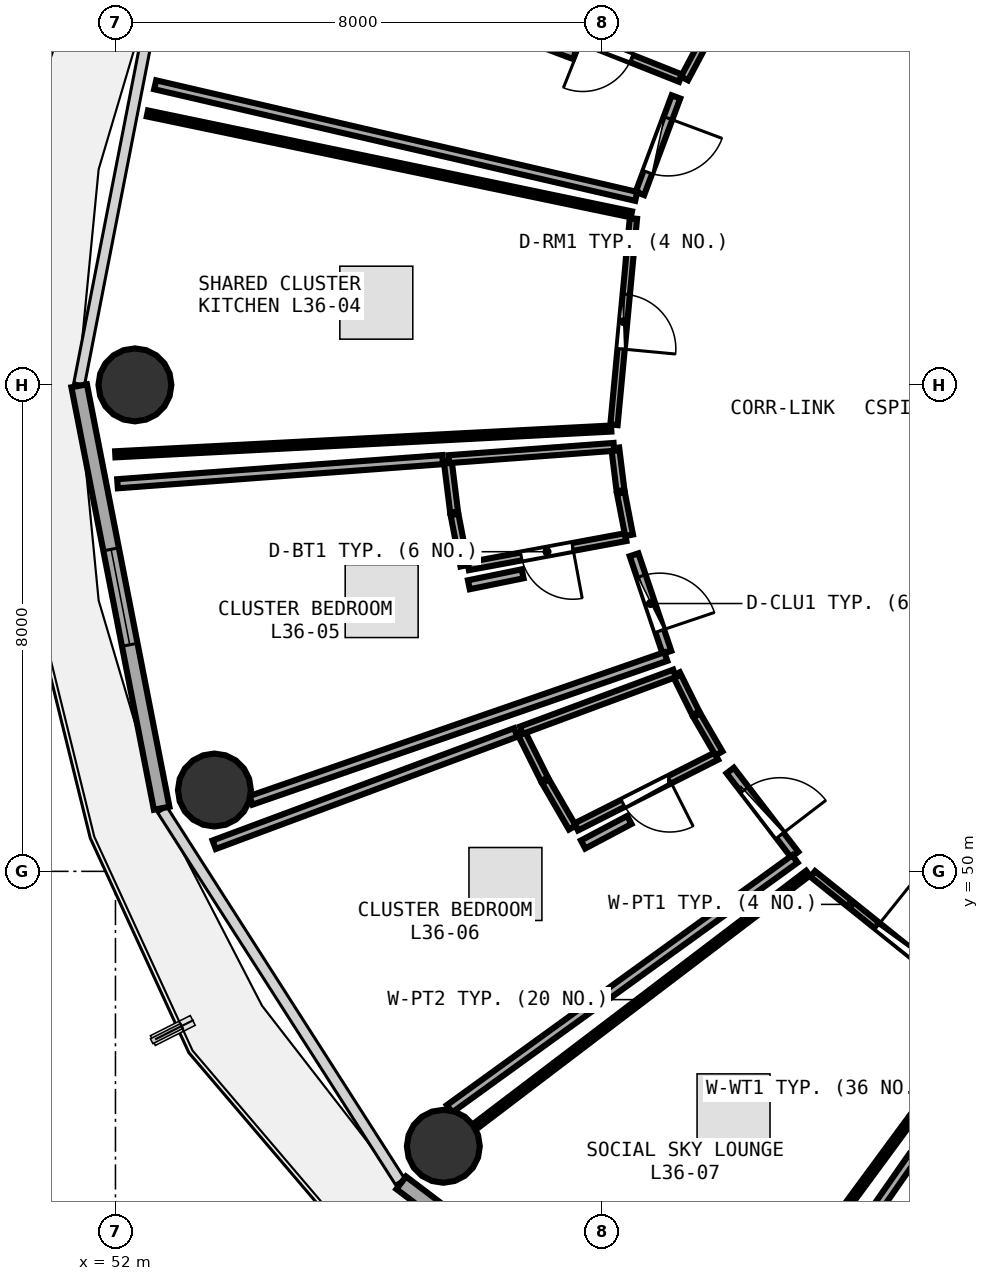
"""IFC4 building model, lengths in metres.
Left out: names, types, materials, properties, quantities, classifications, styles, units other than length and angle.
Written with IfcOpenShell. Run it as: python <this file> out.ifc"""

import sys

from ifc_helpers import new_model, si_unit, direction, frame, frame_2d, origin, origin_2d, place, context, subcontext, project, spatial, rectangle, circle, extrude, element, fill, save


model = new_model("IFC4")
c1 = context("Model", 3, precision=1e-05, world=origin(), true_north=direction((0.0, 1.0)))
c2 = subcontext(c1, "Body", "Model", "MODEL_VIEW")
j1 = project(units=[si_unit("LENGTHUNIT", "METRE"), si_unit("PLANEANGLEUNIT", "RADIAN")], contexts=[c1])
p1 = place(None, origin())
s1 = spatial("IfcSite", under=j1, at=p1, CompositionType="ELEMENT")
p2 = place(p1, origin())
s2 = spatial("IfcBuilding", under=s1, at=p2, CompositionType="ELEMENT")
p3 = place(p2, frame((0.0, 0.0, 143.1)))
s3 = spatial("IfcBuildingStorey", under=s2, at=p3, CompositionType="ELEMENT", Elevation=143.1)
for number, where, z_axis, x_axis in (
    (1, (52.32, 58.0, 0.0), (0.0, 0.0, 1.0), (1.0, 0.0, 0.0)),
    (2, (53.627, 51.337, 0.0), (0.0, 0.0, 1.0), (1.0, 0.0, 0.0)),
    (3, (57.392, 45.479, 0.0), (0.0, 0.0, 1.0), (1.0, 0.0, 0.0)),
):
    element("IfcColumn", number, at=place(p3, frame(where, z_axis=z_axis, x_axis=x_axis)), inside=s3, PredefinedType="COLUMN", context=c2, shape_type="SweptSolid", body=[
        extrude(circle(Radius=0.6, at=origin_2d()), origin(), (0.0, 0.0, 1.0), 3.75),
    ])
p4 = place(p3, frame((51.403, 57.985, 0.0), z_axis=(0.0, 0.0, 1.0), x_axis=(0.191716984769, -0.981450252306, 0.0)))
e4 = element("IfcWall", 4, at=p4, inside=s3, PredefinedType="SOLIDWALL", context=c2, shape_type="SweptSolid", body=[
    extrude(rectangle(XDim=7.079, YDim=0.26, at=frame_2d((3.54, 0.0))), origin(), (0.0, 0.0, 1.0), 3.475),
])
p5 = place(p4, frame((2.74, 0.0, 0.85)))
e5 = element("IfcOpeningElement", 5, at=p5, cuts=e4, PredefinedType="OPENING", context=c2, shape_type="SweptSolid", body=[
    extrude(rectangle(XDim=1.6, YDim=1.45, at=frame_2d((0.8, 0.725))), frame((0.0, 0.14, 0.0), z_axis=(0.0, -1.0, 0.0), x_axis=(1.0, 0.0, 0.0)), (0.0, 0.0, 1.0), 0.28),
])
p6 = place(p3, frame((56.699, 44.878, 0.0), z_axis=(0.0, 0.0, 1.0), x_axis=(0.797163719609, -0.603763202042, 0.0)))
e6 = element("IfcWall", 6, at=p6, inside=s3, PredefinedType="SOLIDWALL", context=c2, shape_type="SweptSolid", body=[
    extrude(rectangle(XDim=7.512, YDim=0.26, at=frame_2d((3.756, 0.0))), origin(), (0.0, 0.0, 1.0), 3.475),
])
p7 = place(p6, frame((2.956, 0.0, 0.85)))
e7 = element("IfcOpeningElement", 7, at=p7, cuts=e6, PredefinedType="OPENING", context=c2, shape_type="SweptSolid", body=[
    extrude(rectangle(XDim=1.6, YDim=1.45, at=frame_2d((0.8, 0.725))), frame((0.0, 0.14, 0.0), z_axis=(0.0, -1.0, 0.0), x_axis=(1.0, 0.0, 0.0)), (0.0, 0.0, 1.0), 0.28),
])
p8 = place(p3, frame((61.293, 63.044, 0.0), z_axis=(0.0, 0.0, 1.0), x_axis=(-0.929051463741, 0.369950507123, 0.0)))
e8 = element("IfcWall", 8, at=p8, inside=s3, PredefinedType="PLUMBINGWALL", context=c2, shape_type="SweptSolid", body=[
    extrude(rectangle(XDim=2.602, YDim=0.13, at=frame_2d((1.301, 0.0))), origin(), (0.0, 0.0, 1.0), 3.235),
])
p9 = place(p8, frame((0.871, 0.0, 0.0)))
e9 = element("IfcOpeningElement", 9, at=p9, cuts=e8, PredefinedType="OPENING", context=c2, shape_type="SweptSolid", body=[
    extrude(rectangle(XDim=0.86, YDim=2.05, at=frame_2d((0.43, 1.025))), frame((0.0, 0.075, 0.0), z_axis=(0.0, -1.0, 0.0), x_axis=(1.0, 0.0, 0.0)), (0.0, 0.0, 1.0), 0.15),
])
p10 = place(p3, frame((61.218, 62.736, 0.0), z_axis=(0.0, 0.0, 1.0), x_axis=(-0.349718783302, -0.93685472332, 0.0)))
e10 = element("IfcWall", 10, at=p10, inside=s3, PredefinedType="PARTITIONING", context=c2, shape_type="SweptSolid", body=[
    extrude(rectangle(XDim=1.696, YDim=0.15, at=frame_2d((0.848, 0.0))), origin(), (0.0, 0.0, 1.0), 3.235),
])
p11 = place(p10, frame((0.373, 0.0, 0.0)))
e11 = element("IfcOpeningElement", 11, at=p11, cuts=e10, PredefinedType="OPENING", context=c2, shape_type="SweptSolid", body=[
    extrude(rectangle(XDim=0.95, YDim=2.08, at=frame_2d((0.475, 1.04))), frame((0.0, 0.085, 0.0), z_axis=(0.0, -1.0, 0.0), x_axis=(1.0, 0.0, 0.0)), (0.0, 0.0, 1.0), 0.17),
])
p12 = place(p3, frame((60.518, 60.736, 0.0), z_axis=(0.0, 0.0, 1.0), x_axis=(-0.093855600535, -0.995585820634, 0.0)))
e12 = element("IfcWall", 12, at=p12, inside=s3, PredefinedType="PARTITIONING", context=c2, shape_type="SweptSolid", body=[
    extrude(rectangle(XDim=3.408, YDim=0.12, at=frame_2d((1.704, 0.0))), origin(), (0.0, 0.0, 1.0), 2.975),
])
p13 = place(p12, frame((1.254, 0.0, 0.0)))
e13 = element("IfcOpeningElement", 13, at=p13, cuts=e12, PredefinedType="OPENING", context=c2, shape_type="SweptSolid", body=[
    extrude(rectangle(XDim=0.9, YDim=2.08, at=frame_2d((0.45, 1.04))), frame((0.0, 0.07, 0.0), z_axis=(0.0, -1.0, 0.0), x_axis=(1.0, 0.0, 0.0)), (0.0, 0.0, 1.0), 0.14),
])
p14 = place(p3, frame((60.392, 55.496, 0.0), z_axis=(0.0, 0.0, 1.0), x_axis=(-0.983321304086, -0.181876916981, 0.0)))
e14 = element("IfcWall", 14, at=p14, inside=s3, PredefinedType="PLUMBINGWALL", context=c2, shape_type="SweptSolid", body=[
    extrude(rectangle(XDim=2.635, YDim=0.13, at=frame_2d((1.317, 0.0))), origin(), (0.0, 0.0, 1.0), 3.175),
])
p15 = place(p14, frame((0.887, 0.0, 0.0)))
e15 = element("IfcOpeningElement", 15, at=p15, cuts=e14, PredefinedType="OPENING", context=c2, shape_type="SweptSolid", body=[
    extrude(rectangle(XDim=0.86, YDim=2.05, at=frame_2d((0.43, 1.025))), frame((0.0, 0.075, 0.0), z_axis=(0.0, -1.0, 0.0), x_axis=(1.0, 0.0, 0.0)), (0.0, 0.0, 1.0), 0.15),
])
p16 = place(p3, frame((60.529, 55.206, 0.0), z_axis=(0.0, 0.0, 1.0), x_axis=(0.319297944841, -0.947654379202, 0.0)))
e16 = element("IfcWall", 16, at=p16, inside=s3, PredefinedType="PARTITIONING", context=c2, shape_type="SweptSolid", body=[
    extrude(rectangle(XDim=1.693, YDim=0.15, at=frame_2d((0.846, 0.0))), origin(), (0.0, 0.0, 1.0), 3.235),
])
p17 = place(p16, frame((0.371, 0.0, 0.0)))
e17 = element("IfcOpeningElement", 17, at=p17, cuts=e16, PredefinedType="OPENING", context=c2, shape_type="SweptSolid", body=[
    extrude(rectangle(XDim=0.95, YDim=2.08, at=frame_2d((0.475, 1.04))), frame((0.0, 0.085, 0.0), z_axis=(0.0, -1.0, 0.0), x_axis=(1.0, 0.0, 0.0)), (0.0, 0.0, 1.0), 0.17),
])
p18 = place(p3, frame((61.883, 51.895, 0.0), z_axis=(0.0, 0.0, 1.0), x_axis=(-0.892490597906, -0.451065995891, 0.0)))
e18 = element("IfcWall", 18, at=p18, inside=s3, PredefinedType="PLUMBINGWALL", context=c2, shape_type="SweptSolid", body=[
    extrude(rectangle(XDim=2.583, YDim=0.13, at=frame_2d((1.292, 0.0))), origin(), (0.0, 0.0, 1.0), 2.975),
])
p19 = place(p18, frame((0.861, 0.0, 0.0)))
e19 = element("IfcOpeningElement", 19, at=p19, cuts=e18, PredefinedType="OPENING", context=c2, shape_type="SweptSolid", body=[
    extrude(rectangle(XDim=0.86, YDim=2.05, at=frame_2d((0.43, 1.025))), frame((0.0, 0.075, 0.0), z_axis=(0.0, -1.0, 0.0), x_axis=(1.0, 0.0, 0.0)), (0.0, 0.0, 1.0), 0.15),
])
p20 = place(p3, frame((62.111, 51.658, 0.0), z_axis=(0.0, 0.0, 1.0), x_axis=(0.608307977949, -0.793701079729, 0.0)))
e20 = element("IfcWall", 20, at=p20, inside=s3, PredefinedType="PARTITIONING", context=c2, shape_type="SweptSolid", body=[
    extrude(rectangle(XDim=1.742, YDim=0.15, at=frame_2d((0.871, 0.0))), origin(), (0.0, 0.0, 1.0), 2.975),
])
p21 = place(p20, frame((0.396, 0.0, 0.0)))
e21 = element("IfcOpeningElement", 21, at=p21, cuts=e20, PredefinedType="OPENING", context=c2, shape_type="SweptSolid", body=[
    extrude(rectangle(XDim=0.95, YDim=2.08, at=frame_2d((0.475, 1.04))), frame((0.0, 0.085, 0.0), z_axis=(0.0, -1.0, 0.0), x_axis=(1.0, 0.0, 0.0)), (0.0, 0.0, 1.0), 0.17),
])
p22 = place(p3, frame((63.468, 49.957, 0.0), z_axis=(0.0, 0.0, 1.0), x_axis=(0.78006790059, -0.625694870099, 0.0)))
e22 = element("IfcWall", 22, at=p22, inside=s3, PredefinedType="PARTITIONING", context=c2, shape_type="SweptSolid", body=[
    extrude(rectangle(XDim=3.631, YDim=0.12, at=frame_2d((1.815, 0.0))), origin(), (0.0, 0.0, 1.0), 2.975),
])
p23 = place(p22, frame((1.366, 0.0, 0.0)))
e23 = element("IfcOpeningElement", 23, at=p23, cuts=e22, PredefinedType="OPENING", context=c2, shape_type="SweptSolid", body=[
    extrude(rectangle(XDim=0.9, YDim=2.08, at=frame_2d((0.45, 1.04))), frame((0.0, 0.07, 0.0), z_axis=(0.0, -1.0, 0.0), x_axis=(1.0, 0.0, 0.0)), (0.0, 0.0, 1.0), 0.14),
])
p24 = place(p3, frame((61.697, 63.676, 0.0), z_axis=(0.0, 0.0, 1.0), x_axis=(-0.469163481751, -0.88311133352, 0.0)))
e24 = element("IfcWall", 24, at=p24, inside=s3, PredefinedType="PLUMBINGWALL", context=c2, shape_type="SweptSolid", body=[
    extrude(rectangle(XDim=0.721, YDim=0.13, at=frame_2d((0.36, 0.0))), origin(), (0.0, 0.0, 1.0), 3.48),
])
p25 = place(p3, frame((60.565, 61.1, 0.0), z_axis=(0.0, 0.0, 1.0), x_axis=(-0.97414388338, 0.225928516292, 0.0)))
e25 = element("IfcWall", 25, at=p25, inside=s3, PredefinedType="PARTITIONING", context=c2, shape_type="SweptSolid", body=[
    extrude(rectangle(XDim=8.122, YDim=0.15, at=frame_2d((4.061, 0.0))), origin(), (0.0, 0.0, 1.0), 3.025),
])
p26 = place(p3, frame((58.688, 63.755, 0.0), z_axis=(0.0, 0.0, 1.0), x_axis=(0.935532386314, -0.353240929336, 0.0)))
e26 = element("IfcWall", 26, at=p26, inside=s3, PredefinedType="PARTITIONING", context=c2, shape_type="SweptSolid", body=[
    extrude(rectangle(XDim=0.922, YDim=0.15, at=frame_2d((0.461, 0.0))), origin(), (0.0, 0.0, 1.0), 3.48),
])
p27 = place(p3, frame((60.153, 57.282, 0.0), z_axis=(0.0, 0.0, 1.0), x_axis=(-0.998652620107, -0.051893586821, 0.0)))
e27 = element("IfcWall", 27, at=p27, inside=s3, PredefinedType="PARTITIONING", context=c2, shape_type="SweptSolid", body=[
    extrude(rectangle(XDim=8.167, YDim=0.1, at=frame_2d((4.083, 0.0))), origin(), (0.0, 0.0, 1.0), 3.025),
])
p28 = place(p3, frame((52.525, 62.464, 0.0), z_axis=(0.0, 0.0, 1.0), x_axis=(0.978946183013, -0.204118521367, 0.0)))
e28 = element("IfcWall", 28, at=p28, inside=s3, PredefinedType="PARTITIONING", context=c2, shape_type="SweptSolid", body=[
    extrude(rectangle(XDim=8.131, YDim=0.1, at=frame_2d((4.065, 0.0))), origin(), (0.0, 0.0, 1.0), 3.025),
])
p29 = place(p3, frame((60.219, 56.962, 0.0), z_axis=(0.0, 0.0, 1.0), x_axis=(0.12297181285, -0.992410163816, 0.0)))
e29 = element("IfcWall", 29, at=p29, inside=s3, PredefinedType="PLUMBINGWALL", context=c2, shape_type="SweptSolid", body=[
    extrude(rectangle(XDim=0.707, YDim=0.13, at=frame_2d((0.354, 0.0))), origin(), (0.0, 0.0, 1.0), 3.48),
])
p30 = place(p3, frame((60.313, 56.221, 0.0), z_axis=(0.0, 0.0, 1.0), x_axis=(0.190075536698, -0.981769469045, 0.0)))
e30 = element("IfcWall", 30, at=p30, inside=s3, PredefinedType="PLUMBINGWALL", context=c2, shape_type="SweptSolid", body=[
    extrude(rectangle(XDim=0.708, YDim=0.13, at=frame_2d((0.354, 0.0))), origin(), (0.0, 0.0, 1.0), 3.48),
])
p31 = place(p3, frame((57.738, 55.026, 0.0), z_axis=(0.0, 0.0, 1.0), x_axis=(-0.189438154161, 0.981892654901, 0.0)))
e31 = element("IfcWall", 31, at=p31, inside=s3, PredefinedType="PLUMBINGWALL", context=c2, shape_type="SweptSolid", body=[
    extrude(rectangle(XDim=0.858, YDim=0.13, at=frame_2d((0.429, 0.0))), origin(), (0.0, 0.0, 1.0), 3.48),
])
p32 = place(p3, frame((57.57, 55.908, 0.0), z_axis=(0.0, 0.0, 1.0), x_axis=(-0.124069838268, 0.992273488123, 0.0)))
e32 = element("IfcWall", 32, at=p32, inside=s3, PredefinedType="PLUMBINGWALL", context=c2, shape_type="SweptSolid", body=[
    extrude(rectangle(XDim=0.856, YDim=0.13, at=frame_2d((0.428, 0.0))), origin(), (0.0, 0.0, 1.0), 3.48),
])
p33 = place(p3, frame((57.481, 56.779, 0.0), z_axis=(0.0, 0.0, 1.0), x_axis=(0.997248398148, 0.074132532608, 0.0)))
e33 = element("IfcWall", 33, at=p33, inside=s3, PredefinedType="PLUMBINGWALL", context=c2, shape_type="SweptSolid", body=[
    extrude(rectangle(XDim=2.724, YDim=0.13, at=frame_2d((1.362, 0.0))), origin(), (0.0, 0.0, 1.0), 3.175),
])
p34 = place(p3, frame((61.051, 53.532, 0.0), z_axis=(0.0, 0.0, 1.0), x_axis=(-0.944870237137, -0.327445010608, 0.0)))
e34 = element("IfcWall", 34, at=p34, inside=s3, PredefinedType="PARTITIONING", context=c2, shape_type="SweptSolid", body=[
    extrude(rectangle(XDim=7.22, YDim=0.15, at=frame_2d((3.61, 0.0))), origin(), (0.0, 0.0, 1.0), 2.975),
])
p35 = place(p3, frame((52.034, 56.374, 0.0), z_axis=(0.0, 0.0, 1.0), x_axis=(0.997255565749, 0.074036049215, 0.0)))
e35 = element("IfcWall", 35, at=p35, inside=s3, PredefinedType="PARTITIONING", context=c2, shape_type="SweptSolid", body=[
    extrude(rectangle(XDim=5.362, YDim=0.15, at=frame_2d((2.681, 0.0))), origin(), (0.0, 0.0, 1.0), 3.025),
])
p36 = place(p3, frame((57.812, 54.713, 0.0), z_axis=(0.0, 0.0, 1.0), x_axis=(0.979802976843, 0.199965313418, 0.0)))
e36 = element("IfcWall", 36, at=p36, inside=s3, PredefinedType="PARTITIONING", context=c2, shape_type="SweptSolid", body=[
    extrude(rectangle(XDim=0.902, YDim=0.15, at=frame_2d((0.451, 0.0))), origin(), (0.0, 0.0, 1.0), 3.175),
])
p37 = place(p3, frame((61.223, 53.245, 0.0), z_axis=(0.0, 0.0, 1.0), x_axis=(0.445176568549, -0.895442808232, 0.0)))
e37 = element("IfcWall", 37, at=p37, inside=s3, PredefinedType="PLUMBINGWALL", context=c2, shape_type="SweptSolid", body=[
    extrude(rectangle(XDim=0.719, YDim=0.13, at=frame_2d((0.36, 0.0))), origin(), (0.0, 0.0, 1.0), 3.235),
])
p38 = place(p3, frame((61.562, 52.566, 0.0), z_axis=(0.0, 0.0, 1.0), x_axis=(0.502403748171, -0.864633144069, 0.0)))
e38 = element("IfcWall", 38, at=p38, inside=s3, PredefinedType="PLUMBINGWALL", context=c2, shape_type="SweptSolid", body=[
    extrude(rectangle(XDim=0.725, YDim=0.13, at=frame_2d((0.362, 0.0))), origin(), (0.0, 0.0, 1.0), 3.48),
])
p39 = place(p3, frame((59.514, 50.72, 0.0), z_axis=(0.0, 0.0, 1.0), x_axis=(-0.501222652689, 0.865318353227, 0.0)))
e39 = element("IfcWall", 39, at=p39, inside=s3, PredefinedType="PLUMBINGWALL", context=c2, shape_type="SweptSolid", body=[
    extrude(rectangle(XDim=0.878, YDim=0.13, at=frame_2d((0.439, 0.0))), origin(), (0.0, 0.0, 1.0), 2.975),
])
p40 = place(p3, frame((59.055, 51.515, 0.0), z_axis=(0.0, 0.0, 1.0), x_axis=(-0.446317376376, 0.894874739584, 0.0)))
e40 = element("IfcWall", 40, at=p40, inside=s3, PredefinedType="PLUMBINGWALL", context=c2, shape_type="SweptSolid", body=[
    extrude(rectangle(XDim=0.872, YDim=0.13, at=frame_2d((0.436, 0.0))), origin(), (0.0, 0.0, 1.0), 3.48),
])
p41 = place(p3, frame((58.676, 52.32, 0.0), z_axis=(0.0, 0.0, 1.0), x_axis=(0.937399857035, 0.348254946887, 0.0)))
e41 = element("IfcWall", 41, at=p41, inside=s3, PredefinedType="PLUMBINGWALL", context=c2, shape_type="SweptSolid", body=[
    extrude(rectangle(XDim=2.688, YDim=0.13, at=frame_2d((1.344, 0.0))), origin(), (0.0, 0.0, 1.0), 3.235),
])
p42 = place(p3, frame((63.175, 50.205, 0.0), z_axis=(0.0, 0.0, 1.0), x_axis=(-0.810227225477, -0.586115895618, 0.0)))
e42 = element("IfcWall", 42, at=p42, inside=s3, PredefinedType="PARTITIONING", context=c2, shape_type="SweptSolid", body=[
    extrude(rectangle(XDim=7.011, YDim=0.15, at=frame_2d((3.506, 0.0))), origin(), (0.0, 0.0, 1.0), 3.175),
])
p43 = place(p3, frame((53.624, 50.438, 0.0), z_axis=(0.0, 0.0, 1.0), x_axis=(0.937175901168, 0.348857177468, 0.0)))
e43 = element("IfcWall", 43, at=p43, inside=s3, PredefinedType="PARTITIONING", context=c2, shape_type="SweptSolid", body=[
    extrude(rectangle(XDim=5.292, YDim=0.15, at=frame_2d((2.646, 0.0))), origin(), (0.0, 0.0, 1.0), 2.975),
])
p44 = place(p3, frame((59.69, 50.442, 0.0), z_axis=(0.0, 0.0, 1.0), x_axis=(0.883456769574, 0.468512685308, 0.0)))
e44 = element("IfcWall", 44, at=p44, inside=s3, PredefinedType="PARTITIONING", context=c2, shape_type="SweptSolid", body=[
    extrude(rectangle(XDim=0.861, YDim=0.15, at=frame_2d((0.431, 0.0))), origin(), (0.0, 0.0, 1.0), 3.48),
])
p45 = place(p3, frame((66.323, 47.615, 0.0), z_axis=(0.0, 0.0, 1.0), x_axis=(-0.592678959784, -0.805438793845, 0.0)))
e45 = element("IfcWall", 45, at=p45, inside=s3, PredefinedType="PARTITIONING", context=c2, shape_type="SweptSolid", body=[
    extrude(rectangle(XDim=7.624, YDim=0.1, at=frame_2d((3.812, 0.0))), origin(), (0.0, 0.0, 1.0), 2.975),
])
p46 = place(p3, frame((57.921, 45.811, 0.0), z_axis=(0.0, 0.0, 1.0), x_axis=(0.79595600815, 0.60535446896, 0.0)))
e46 = element("IfcWall", 46, at=p46, inside=s3, PredefinedType="PARTITIONING", context=c2, shape_type="SweptSolid", body=[
    extrude(rectangle(XDim=6.869, YDim=0.1, at=frame_2d((3.435, 0.0))), origin(), (0.0, 0.0, 1.0), 2.975),
])
p47 = place(p3, frame((62.257, 41.211, 0.0), z_axis=(0.0, 0.0, 1.0), x_axis=(0.572125752908, 0.820165911789, 0.0)))
e47 = element("IfcWall", 47, at=p47, inside=s3, PredefinedType="PARTITIONING", context=c2, shape_type="SweptSolid", body=[
    extrude(rectangle(XDim=4.992, YDim=0.15, at=frame_2d((2.496, 0.0))), origin(), (0.0, 0.0, 1.0), 2.975),
])
p48 = place(p5, origin())
e48 = element("IfcWindow", 48, at=p48, inside=s3, PartitioningType="SINGLE_PANEL", PredefinedType="WINDOW", context=c2, shape_type="SweptSolid", body=[
    extrude(rectangle(XDim=1.6, YDim=1.45, at=frame_2d((0.8, 0.725))), frame((0.0, 0.03, 0.0), z_axis=(0.0, -1.0, 0.0), x_axis=(1.0, 0.0, 0.0)), (0.0, 0.0, 1.0), 0.06),
])
fill(e5, e48)
p49 = place(p9, origin())
e49 = element("IfcDoor", 49, at=p49, inside=s3, OperationType="SINGLE_SWING_RIGHT", PredefinedType="DOOR", context=c2, shape_type="SweptSolid", body=[
    extrude(rectangle(XDim=0.86, YDim=2.05, at=frame_2d((0.43, 1.025))), frame((0.0, 0.025, 0.0), z_axis=(0.0, -1.0, 0.0), x_axis=(1.0, 0.0, 0.0)), (0.0, 0.0, 1.0), 0.05),
])
fill(e9, e49)
p50 = place(p11, origin())
e50 = element("IfcDoor", 50, at=p50, inside=s3, OperationType="SINGLE_SWING_LEFT", PredefinedType="DOOR", context=c2, shape_type="SweptSolid", body=[
    extrude(rectangle(XDim=0.95, YDim=2.08, at=frame_2d((0.475, 1.04))), frame((0.0, 0.025, 0.0), z_axis=(0.0, -1.0, 0.0), x_axis=(1.0, 0.0, 0.0)), (0.0, 0.0, 1.0), 0.05),
])
fill(e11, e50)
p51 = place(p13, origin())
e51 = element("IfcDoor", 51, at=p51, inside=s3, OperationType="SINGLE_SWING_RIGHT", PredefinedType="DOOR", context=c2, shape_type="SweptSolid", body=[
    extrude(rectangle(XDim=0.9, YDim=2.08, at=frame_2d((0.45, 1.04))), frame((0.0, 0.025, 0.0), z_axis=(0.0, -1.0, 0.0), x_axis=(1.0, 0.0, 0.0)), (0.0, 0.0, 1.0), 0.05),
])
fill(e13, e51)
p52 = place(p15, origin())
e52 = element("IfcDoor", 52, at=p52, inside=s3, OperationType="SINGLE_SWING_LEFT", PredefinedType="DOOR", context=c2, shape_type="SweptSolid", body=[
    extrude(rectangle(XDim=0.86, YDim=2.05, at=frame_2d((0.43, 1.025))), frame((0.0, 0.025, 0.0), z_axis=(0.0, -1.0, 0.0), x_axis=(1.0, 0.0, 0.0)), (0.0, 0.0, 1.0), 0.05),
])
fill(e15, e52)
p53 = place(p17, origin())
e53 = element("IfcDoor", 53, at=p53, inside=s3, OperationType="SINGLE_SWING_RIGHT", PredefinedType="DOOR", context=c2, shape_type="SweptSolid", body=[
    extrude(rectangle(XDim=0.95, YDim=2.08, at=frame_2d((0.475, 1.04))), frame((0.0, 0.025, 0.0), z_axis=(0.0, -1.0, 0.0), x_axis=(1.0, 0.0, 0.0)), (0.0, 0.0, 1.0), 0.05),
])
fill(e17, e53)
p54 = place(p19, origin())
e54 = element("IfcDoor", 54, at=p54, inside=s3, OperationType="SINGLE_SWING_LEFT", PredefinedType="DOOR", context=c2, shape_type="SweptSolid", body=[
    extrude(rectangle(XDim=0.86, YDim=2.05, at=frame_2d((0.43, 1.025))), frame((0.0, 0.025, 0.0), z_axis=(0.0, -1.0, 0.0), x_axis=(1.0, 0.0, 0.0)), (0.0, 0.0, 1.0), 0.05),
])
fill(e19, e54)
p55 = place(p21, origin())
e55 = element("IfcDoor", 55, at=p55, inside=s3, OperationType="SINGLE_SWING_RIGHT", PredefinedType="DOOR", context=c2, shape_type="SweptSolid", body=[
    extrude(rectangle(XDim=0.95, YDim=2.08, at=frame_2d((0.475, 1.04))), frame((0.0, 0.025, 0.0), z_axis=(0.0, -1.0, 0.0), x_axis=(1.0, 0.0, 0.0)), (0.0, 0.0, 1.0), 0.05),
])
fill(e21, e55)
p56 = place(p23, origin())
e56 = element("IfcDoor", 56, at=p56, inside=s3, OperationType="SINGLE_SWING_LEFT", PredefinedType="DOOR", context=c2, shape_type="SweptSolid", body=[
    extrude(rectangle(XDim=0.9, YDim=2.08, at=frame_2d((0.45, 1.04))), frame((0.0, 0.025, 0.0), z_axis=(0.0, -1.0, 0.0), x_axis=(1.0, 0.0, 0.0)), (0.0, 0.0, 1.0), 0.05),
])
fill(e23, e56)
save(model, sys.argv[1])
